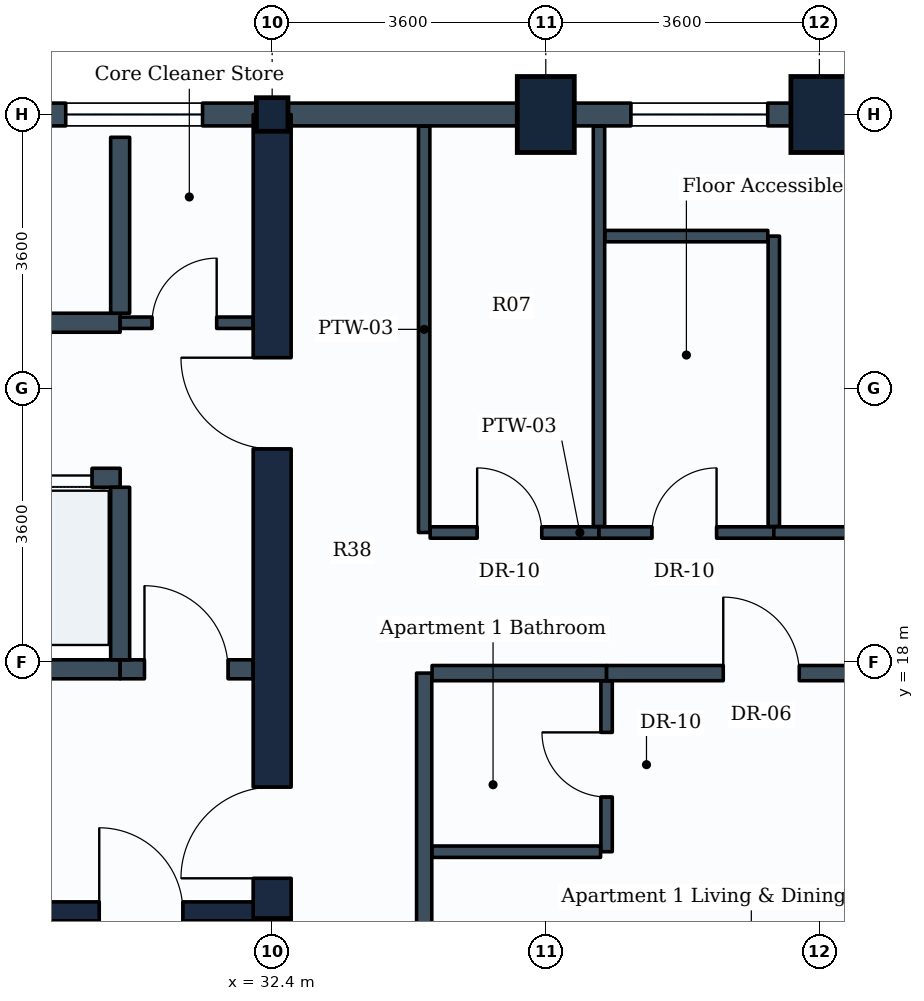
"""IFC4 building model, lengths in metres.
Left out: names, types, materials, properties, quantities, classifications, styles, units other than length and angle.
Written with IfcOpenShell. Run it as: python <this file> out.ifc"""

import sys

from ifc_helpers import new_model, si_unit, direction, frame, frame_2d, origin, origin_2d, place, context, subcontext, project, spatial, rectangle, i_section, extrude, element, fill, save


model = new_model("IFC4")
c1 = context("Model", 3, precision=1e-05, world=origin(), true_north=direction((0.0, 1.0)))
c2 = subcontext(c1, "Body", "Model", "MODEL_VIEW")
j1 = project(units=[si_unit("LENGTHUNIT", "METRE"), si_unit("PLANEANGLEUNIT", "RADIAN")], contexts=[c1])
p1 = place(None, origin())
s1 = spatial("IfcSite", under=j1, at=p1, CompositionType="ELEMENT")
p2 = place(p1, origin())
s2 = spatial("IfcBuilding", under=s1, at=p2, CompositionType="ELEMENT")
p3 = place(p2, frame((0.0, 0.0, 142.8)))
s3 = spatial("IfcBuildingStorey", under=s2, at=p3, CompositionType="ELEMENT", Elevation=142.8)
for number, where, z_axis, x_axis in (
    (1, (32.4, 14.4, 0.0), (0.0, 0.0, 1.0), (1.0, 0.0, 0.0)),
    (2, (32.4, 25.2, 0.0), (0.0, 0.0, 1.0), (1.0, 0.0, 0.0)),
):
    element("IfcColumn", number, at=place(p3, frame(where, z_axis=z_axis, x_axis=x_axis)), inside=s3, PredefinedType="COLUMN", context=c2, shape_type="SweptSolid", body=[
        extrude(i_section(OverallWidth=0.416, OverallDepth=0.442, WebThickness=0.025, FlangeThickness=0.041, FilletRadius=0.015, at=origin_2d()), origin(), (0.0, 0.0, 1.0), 3.8),
    ])
for number, where, z_axis, x_axis in (
    (3, (36.0, 25.2, 0.0), (0.0, 0.0, 1.0), (1.0, 0.0, 0.0)),
    (4, (39.6, 25.2, 0.0), (0.0, 0.0, 1.0), (1.0, 0.0, 0.0)),
):
    element("IfcColumn", number, at=place(p3, frame(where, z_axis=z_axis, x_axis=x_axis)), inside=s3, PredefinedType="COLUMN", context=c2, shape_type="SweptSolid", body=[
        extrude(rectangle(XDim=0.75, YDim=1.0, at=origin_2d()), origin(), (0.0, 0.0, 1.0), 3.8),
    ])
p4 = place(p3, frame((39.6, 25.2, 0.0), z_axis=(0.0, 0.0, 1.0), x_axis=(1.0, 0.0, 0.0)))
e5 = element("IfcWall", 5, at=p4, inside=s3, PredefinedType="STANDARD", context=c2, shape_type="SweptSolid", body=[
    extrude(rectangle(XDim=1.8, YDim=0.3, at=frame_2d((0.9, 0.0))), origin(), (0.0, 0.0, 1.0), 2.93),
])
p5 = place(p3, frame((36.0, 25.2, 0.0), z_axis=(0.0, 0.0, 1.0), x_axis=(1.0, 0.0, 0.0)))
e6 = element("IfcWall", 6, at=p5, inside=s3, PredefinedType="STANDARD", context=c2, shape_type="SweptSolid", body=[
    extrude(rectangle(XDim=3.6, YDim=0.3, at=frame_2d((1.8, 0.0))), origin(), (0.0, 0.0, 1.0), 2.93),
])
p6 = place(p5, frame((1.12, 0.0, 0.85)))
e7 = element("IfcOpeningElement", 7, at=p6, cuts=e6, PredefinedType="OPENING", context=c2, shape_type="SweptSolid", body=[
    extrude(rectangle(XDim=1.8, YDim=1.35, at=frame_2d((0.9, 0.675))), frame((0.0, 0.16, 0.0), z_axis=(0.0, -1.0, 0.0), x_axis=(1.0, 0.0, 0.0)), (0.0, 0.0, 1.0), 0.32),
])
p7 = place(p3, frame((32.4, 25.2, 0.0), z_axis=(0.0, 0.0, 1.0), x_axis=(1.0, 0.0, 0.0)))
e8 = element("IfcWall", 8, at=p7, inside=s3, PredefinedType="STANDARD", context=c2, shape_type="SweptSolid", body=[
    extrude(rectangle(XDim=3.6, YDim=0.3, at=frame_2d((1.8, 0.0))), origin(), (0.0, 0.0, 1.0), 2.93),
])
p8 = place(p3, frame((28.8, 25.2, 0.0), z_axis=(0.0, 0.0, 1.0), x_axis=(1.0, 0.0, 0.0)))
e9 = element("IfcWall", 9, at=p8, inside=s3, PredefinedType="STANDARD", context=c2, shape_type="SweptSolid", body=[
    extrude(rectangle(XDim=3.6, YDim=0.3, at=frame_2d((1.8, 0.0))), origin(), (0.0, 0.0, 1.0), 3.535),
])
p9 = place(p8, frame((0.884, 0.0, 0.85)))
e10 = element("IfcOpeningElement", 10, at=p9, cuts=e9, PredefinedType="OPENING", context=c2, shape_type="SweptSolid", body=[
    extrude(rectangle(XDim=1.8, YDim=1.35, at=frame_2d((0.9, 0.675))), frame((0.0, 0.16, 0.0), z_axis=(0.0, -1.0, 0.0), x_axis=(1.0, 0.0, 0.0)), (0.0, 0.0, 1.0), 0.32),
])
p10 = place(p3, frame((32.4, 10.8, 0.0), z_axis=(0.0, 0.0, 1.0), x_axis=(0.0, 1.0, 0.0)))
e11 = element("IfcWall", 11, at=p10, inside=s3, PredefinedType="SHEAR", context=c2, shape_type="SweptSolid", body=[
    extrude(rectangle(XDim=14.4, YDim=0.5, at=frame_2d((7.2, 0.0))), origin(), (0.0, 0.0, 1.0), 3.55),
])
p11 = place(p10, frame((4.35, 0.0, 0.0)))
e12 = element("IfcOpeningElement", 12, at=p11, cuts=e11, PredefinedType="OPENING", context=c2, shape_type="SweptSolid", body=[
    extrude(rectangle(XDim=1.2, YDim=2.1, at=frame_2d((0.6, 1.05))), frame((0.0, 0.26, 0.0), z_axis=(0.0, -1.0, 0.0), x_axis=(1.0, 0.0, 0.0)), (0.0, 0.0, 1.0), 0.52),
])
p12 = place(p10, frame((10.0, 0.0, 0.0)))
e13 = element("IfcOpeningElement", 13, at=p12, cuts=e11, PredefinedType="OPENING", context=c2, shape_type="SweptSolid", body=[
    extrude(rectangle(XDim=1.2, YDim=2.1, at=frame_2d((0.6, 1.05))), frame((0.0, 0.26, 0.0), z_axis=(0.0, -1.0, 0.0), x_axis=(1.0, 0.0, 0.0)), (0.0, 0.0, 1.0), 0.52),
])
p13 = place(p3, frame((23.35, 14.715, 0.0), z_axis=(0.0, 0.0, 1.0), x_axis=(1.0, 0.0, 0.0)))
e14 = element("IfcWall", 14, at=p13, inside=s3, PredefinedType="SHEAR", context=c2, shape_type="SweptSolid", body=[
    extrude(rectangle(XDim=8.8, YDim=0.25, at=frame_2d((4.4, 0.0))), origin(), (0.0, 0.0, 1.0), 3.55),
])
p14 = place(p13, frame((6.775, 0.0, 0.0)))
e15 = element("IfcOpeningElement", 15, at=p14, cuts=e14, PredefinedType="OPENING", context=c2, shape_type="SweptSolid", body=[
    extrude(rectangle(XDim=1.1, YDim=2.1, at=frame_2d((0.55, 1.05))), frame((0.0, 0.135, 0.0), z_axis=(0.0, -1.0, 0.0), x_axis=(1.0, 0.0, 0.0)), (0.0, 0.0, 1.0), 0.27),
])
p15 = place(p3, frame((21.88, 17.9, 0.0), z_axis=(0.0, 0.0, 1.0), x_axis=(1.0, 0.0, 0.0)))
e16 = element("IfcWall", 16, at=p15, inside=s3, PredefinedType="PARTITIONING", context=c2, shape_type="SweptSolid", body=[
    extrude(rectangle(XDim=8.52, YDim=0.25, at=frame_2d((4.26, 0.0))), origin(), (0.0, 0.0, 1.0), 3.535),
])
p16 = place(p3, frame((30.4, 17.9, 0.0), z_axis=(0.0, 0.0, 1.0), x_axis=(1.0, 0.0, 0.0)))
e17 = element("IfcWall", 17, at=p16, inside=s3, PredefinedType="PARTITIONING", context=c2, shape_type="SweptSolid", body=[
    extrude(rectangle(XDim=1.75, YDim=0.25, at=frame_2d((0.875, 0.0))), origin(), (0.0, 0.0, 1.0), 3.535),
])
p17 = place(p16, frame((0.32, 0.0, 0.0)))
e18 = element("IfcOpeningElement", 18, at=p17, cuts=e17, PredefinedType="OPENING", context=c2, shape_type="SweptSolid", body=[
    extrude(rectangle(XDim=1.1, YDim=2.1, at=frame_2d((0.55, 1.05))), frame((0.0, 0.135, 0.0), z_axis=(0.0, -1.0, 0.0), x_axis=(1.0, 0.0, 0.0)), (0.0, 0.0, 1.0), 0.27),
])
p18 = place(p3, frame((23.18, 20.42, 0.0), z_axis=(0.0, 0.0, 1.0), x_axis=(1.0, 0.0, 0.0)))
e19 = element("IfcWall", 19, at=p18, inside=s3, PredefinedType="PARTITIONING", context=c2, shape_type="SweptSolid", body=[
    extrude(rectangle(XDim=7.22, YDim=0.25, at=frame_2d((3.61, 0.0))), origin(), (0.0, 0.0, 1.0), 3.535),
])
p19 = place(p18, frame((0.41, 0.0, 0.0)))
e20 = element("IfcOpeningElement", 20, at=p19, cuts=e19, PredefinedType="OPENING", context=c2, shape_type="SweptSolid", body=[
    extrude(rectangle(XDim=1.1, YDim=2.1, at=frame_2d((0.55, 1.05))), frame((0.0, 0.135, 0.0), z_axis=(0.0, -1.0, 0.0), x_axis=(1.0, 0.0, 0.0)), (0.0, 0.0, 1.0), 0.27),
])
p20 = place(p18, frame((2.19, 0.0, 0.0)))
e21 = element("IfcOpeningElement", 21, at=p20, cuts=e19, PredefinedType="OPENING", context=c2, shape_type="SweptSolid", body=[
    extrude(rectangle(XDim=1.1, YDim=2.1, at=frame_2d((0.55, 1.05))), frame((0.0, 0.135, 0.0), z_axis=(0.0, -1.0, 0.0), x_axis=(1.0, 0.0, 0.0)), (0.0, 0.0, 1.0), 0.27),
])
p21 = place(p18, frame((3.97, 0.0, 0.0)))
e22 = element("IfcOpeningElement", 22, at=p21, cuts=e19, PredefinedType="OPENING", context=c2, shape_type="SweptSolid", body=[
    extrude(rectangle(XDim=1.1, YDim=2.1, at=frame_2d((0.55, 1.05))), frame((0.0, 0.135, 0.0), z_axis=(0.0, -1.0, 0.0), x_axis=(1.0, 0.0, 0.0)), (0.0, 0.0, 1.0), 0.27),
])
p22 = place(p18, frame((5.75, 0.0, 0.0)))
e23 = element("IfcOpeningElement", 23, at=p22, cuts=e19, PredefinedType="OPENING", context=c2, shape_type="SweptSolid", body=[
    extrude(rectangle(XDim=1.1, YDim=2.1, at=frame_2d((0.55, 1.05))), frame((0.0, 0.135, 0.0), z_axis=(0.0, -1.0, 0.0), x_axis=(1.0, 0.0, 0.0)), (0.0, 0.0, 1.0), 0.27),
])
p23 = place(p3, frame((30.4, 18.025, 0.0), z_axis=(0.0, 0.0, 1.0), x_axis=(0.0, 1.0, 0.0)))
e24 = element("IfcWall", 24, at=p23, inside=s3, PredefinedType="PARTITIONING", context=c2, shape_type="SweptSolid", body=[
    extrude(rectangle(XDim=2.27, YDim=0.25, at=frame_2d((1.135, 0.0))), origin(), (0.0, 0.0, 1.0), 3.535),
])
p24 = place(p3, frame((23.18, 22.46, 0.0), z_axis=(0.0, 0.0, 1.0), x_axis=(1.0, 0.0, 0.0)))
e25 = element("IfcWall", 25, at=p24, inside=s3, PredefinedType="PARTITIONING", context=c2, shape_type="SweptSolid", body=[
    extrude(rectangle(XDim=7.22, YDim=0.25, at=frame_2d((3.61, 0.0))), origin(), (0.0, 0.0, 1.0), 3.535),
])
p25 = place(p3, frame((30.4, 22.585, 0.0), z_axis=(0.0, 0.0, 1.0), x_axis=(0.0, 1.0, 0.0)))
e26 = element("IfcWall", 26, at=p25, inside=s3, PredefinedType="PARTITIONING", context=c2, shape_type="SweptSolid", body=[
    extrude(rectangle(XDim=2.315, YDim=0.25, at=frame_2d((1.157, 0.0))), origin(), (0.0, 0.0, 1.0), 3.535),
])
p26 = place(p3, frame((30.4, 22.46, 0.0), z_axis=(0.0, 0.0, 1.0), x_axis=(1.0, 0.0, 0.0)))
e27 = element("IfcWall", 27, at=p26, inside=s3, PredefinedType="PARTITIONING", context=c2, shape_type="SweptSolid", body=[
    extrude(rectangle(XDim=1.75, YDim=0.15, at=frame_2d((0.875, 0.0))), origin(), (0.0, 0.0, 1.0), 3.535),
])
p27 = place(p26, frame((0.42, 0.0, 0.0)))
e28 = element("IfcOpeningElement", 28, at=p27, cuts=e27, PredefinedType="OPENING", context=c2, shape_type="SweptSolid", body=[
    extrude(rectangle(XDim=0.85, YDim=2.1, at=frame_2d((0.425, 1.05))), frame((0.0, 0.085, 0.0), z_axis=(0.0, -1.0, 0.0), x_axis=(1.0, 0.0, 0.0)), (0.0, 0.0, 1.0), 0.17),
])
p28 = place(p3, frame((34.4, 19.7, 0.0), z_axis=(0.0, 0.0, 1.0), x_axis=(0.0, 1.0, 0.0)))
e29 = element("IfcWall", 29, at=p28, inside=s3, PredefinedType="PARTITIONING", context=c2, shape_type="SweptSolid", body=[
    extrude(rectangle(XDim=5.346, YDim=0.15, at=frame_2d((2.673, 0.0))), origin(), (0.0, 0.0, 1.0), 2.93),
])
p29 = place(p3, frame((34.479, 19.7, 0.0), z_axis=(0.0, 0.0, 1.0), x_axis=(1.0, 0.0, 0.0)))
e30 = element("IfcWall", 30, at=p29, inside=s3, PredefinedType="PARTITIONING", context=c2, shape_type="SweptSolid", body=[
    extrude(rectangle(XDim=2.221, YDim=0.15, at=frame_2d((1.11, 0.0))), origin(), (0.0, 0.0, 1.0), 3.22),
])
p30 = place(p29, frame((0.618, 0.0, 0.0)))
e31 = element("IfcOpeningElement", 31, at=p30, cuts=e30, PredefinedType="OPENING", context=c2, shape_type="SweptSolid", body=[
    extrude(rectangle(XDim=0.85, YDim=2.1, at=frame_2d((0.425, 1.05))), frame((0.0, 0.085, 0.0), z_axis=(0.0, -1.0, 0.0), x_axis=(1.0, 0.0, 0.0)), (0.0, 0.0, 1.0), 0.17),
])
p31 = place(p3, frame((36.7, 19.779, 0.0), z_axis=(0.0, 0.0, 1.0), x_axis=(0.0, 1.0, 0.0)))
e32 = element("IfcWall", 32, at=p31, inside=s3, PredefinedType="PARTITIONING", context=c2, shape_type="SweptSolid", body=[
    extrude(rectangle(XDim=5.267, YDim=0.15, at=frame_2d((2.633, 0.0))), origin(), (0.0, 0.0, 1.0), 2.93),
])
p32 = place(p3, frame((36.7, 19.7, 0.0), z_axis=(0.0, 0.0, 1.0), x_axis=(1.0, 0.0, 0.0)))
e33 = element("IfcWall", 33, at=p32, inside=s3, PredefinedType="PARTITIONING", context=c2, shape_type="SweptSolid", body=[
    extrude(rectangle(XDim=2.3, YDim=0.15, at=frame_2d((1.15, 0.0))), origin(), (0.0, 0.0, 1.0), 3.535),
])
p33 = place(p32, frame((0.697, 0.0, 0.0)))
e34 = element("IfcOpeningElement", 34, at=p33, cuts=e33, PredefinedType="OPENING", context=c2, shape_type="SweptSolid", body=[
    extrude(rectangle(XDim=0.85, YDim=2.1, at=frame_2d((0.425, 1.05))), frame((0.0, 0.085, 0.0), z_axis=(0.0, -1.0, 0.0), x_axis=(1.0, 0.0, 0.0)), (0.0, 0.0, 1.0), 0.17),
])
p34 = place(p3, frame((39.0, 19.779, 0.0), z_axis=(0.0, 0.0, 1.0), x_axis=(0.0, 1.0, 0.0)))
e35 = element("IfcWall", 35, at=p34, inside=s3, PredefinedType="PARTITIONING", context=c2, shape_type="SweptSolid", body=[
    extrude(rectangle(XDim=3.821, YDim=0.15, at=frame_2d((1.911, 0.0))), origin(), (0.0, 0.0, 1.0), 3.08),
])
p35 = place(p3, frame((36.779, 23.6, 0.0), z_axis=(0.0, 0.0, 1.0), x_axis=(1.0, 0.0, 0.0)))
e36 = element("IfcWall", 36, at=p35, inside=s3, PredefinedType="PARTITIONING", context=c2, shape_type="SweptSolid", body=[
    extrude(rectangle(XDim=2.142, YDim=0.15, at=frame_2d((1.071, 0.0))), origin(), (0.0, 0.0, 1.0), 3.535),
])
p36 = place(p3, frame((34.4, 3.754, 0.0), z_axis=(0.0, 0.0, 1.0), x_axis=(0.0, 1.0, 0.0)))
e37 = element("IfcWall", 37, at=p36, inside=s3, PredefinedType="PARTITIONING", context=c2, shape_type="SweptSolid", body=[
    extrude(rectangle(XDim=14.096, YDim=0.2, at=frame_2d((7.048, 0.0))), origin(), (0.0, 0.0, 1.0), 2.93),
])
p37 = place(p3, frame((34.504, 17.85, 0.0), z_axis=(0.0, 0.0, 1.0), x_axis=(1.0, 0.0, 0.0)))
e38 = element("IfcWall", 38, at=p37, inside=s3, PredefinedType="PARTITIONING", context=c2, shape_type="SweptSolid", body=[
    extrude(rectangle(XDim=2.296, YDim=0.2, at=frame_2d((1.148, 0.0))), origin(), (0.0, 0.0, 1.0), 3.08),
])
p38 = place(p3, frame((36.8, 15.5, 0.0), z_axis=(0.0, 0.0, 1.0), x_axis=(0.0, 1.0, 0.0)))
e39 = element("IfcWall", 39, at=p38, inside=s3, PredefinedType="PARTITIONING", context=c2, shape_type="SweptSolid", body=[
    extrude(rectangle(XDim=2.246, YDim=0.15, at=frame_2d((1.123, 0.0))), origin(), (0.0, 0.0, 1.0), 3.535),
])
p39 = place(p38, frame((0.72, 0.0, 0.0)))
e40 = element("IfcOpeningElement", 40, at=p39, cuts=e39, PredefinedType="OPENING", context=c2, shape_type="SweptSolid", body=[
    extrude(rectangle(XDim=0.85, YDim=2.1, at=frame_2d((0.425, 1.05))), frame((0.0, 0.085, 0.0), z_axis=(0.0, -1.0, 0.0), x_axis=(1.0, 0.0, 0.0)), (0.0, 0.0, 1.0), 0.17),
])
p40 = place(p3, frame((34.504, 15.5, 0.0), z_axis=(0.0, 0.0, 1.0), x_axis=(1.0, 0.0, 0.0)))
e41 = element("IfcWall", 41, at=p40, inside=s3, PredefinedType="PARTITIONING", context=c2, shape_type="SweptSolid", body=[
    extrude(rectangle(XDim=2.217, YDim=0.15, at=frame_2d((1.108, 0.0))), origin(), (0.0, 0.0, 1.0), 3.22),
])
p41 = place(p3, frame((36.8, 17.85, 0.0), z_axis=(0.0, 0.0, 1.0), x_axis=(1.0, 0.0, 0.0)))
e42 = element("IfcWall", 42, at=p41, inside=s3, PredefinedType="PARTITIONING", context=c2, shape_type="SweptSolid", body=[
    extrude(rectangle(XDim=3.966, YDim=0.2, at=frame_2d((1.983, 0.0))), origin(), (0.0, 0.0, 1.0), 3.08),
])
p42 = place(p41, frame((1.535, 0.0, 0.0)))
e43 = element("IfcOpeningElement", 43, at=p42, cuts=e42, PredefinedType="OPENING", context=c2, shape_type="SweptSolid", body=[
    extrude(rectangle(XDim=1.0, YDim=2.1, at=frame_2d((0.5, 1.05))), frame((0.0, 0.11, 0.0), z_axis=(0.0, -1.0, 0.0), x_axis=(1.0, 0.0, 0.0)), (0.0, 0.0, 1.0), 0.22),
])
p43 = place(p3, frame((39.0, 19.7, 0.0), z_axis=(0.0, 0.0, 1.0), x_axis=(1.0, 0.0, 0.0)))
e44 = element("IfcWall", 44, at=p43, inside=s3, PredefinedType="PARTITIONING", context=c2, shape_type="SweptSolid", body=[
    extrude(rectangle(XDim=14.846, YDim=0.15, at=frame_2d((7.423, 0.0))), origin(), (0.0, 0.0, 1.0), 2.93),
])
p44 = place(p43, frame((6.96, 0.0, 0.0)))
e45 = element("IfcOpeningElement", 45, at=p44, cuts=e44, PredefinedType="OPENING", context=c2, shape_type="SweptSolid", body=[
    extrude(rectangle(XDim=1.0, YDim=2.1, at=frame_2d((0.5, 1.05))), frame((0.0, 0.085, 0.0), z_axis=(0.0, -1.0, 0.0), x_axis=(1.0, 0.0, 0.0)), (0.0, 0.0, 1.0), 0.17),
])
p45 = place(p6, origin())
e46 = element("IfcWindow", 46, at=p45, inside=s3, PartitioningType="SINGLE_PANEL", PredefinedType="WINDOW", context=c2, shape_type="SweptSolid", body=[
    extrude(rectangle(XDim=1.8, YDim=1.35, at=frame_2d((0.9, 0.675))), frame((0.0, 0.03, 0.0), z_axis=(0.0, -1.0, 0.0), x_axis=(1.0, 0.0, 0.0)), (0.0, 0.0, 1.0), 0.06),
])
fill(e7, e46)
p46 = place(p9, origin())
e47 = element("IfcWindow", 47, at=p46, inside=s3, PartitioningType="SINGLE_PANEL", PredefinedType="WINDOW", context=c2, shape_type="SweptSolid", body=[
    extrude(rectangle(XDim=1.8, YDim=1.35, at=frame_2d((0.9, 0.675))), frame((0.0, 0.03, 0.0), z_axis=(0.0, -1.0, 0.0), x_axis=(1.0, 0.0, 0.0)), (0.0, 0.0, 1.0), 0.06),
])
fill(e10, e47)
p47 = place(p14, origin())
e48 = element("IfcDoor", 48, at=p47, inside=s3, OperationType="SINGLE_SWING_LEFT", PredefinedType="DOOR", context=c2, shape_type="SweptSolid", body=[
    extrude(rectangle(XDim=1.1, YDim=2.1, at=frame_2d((0.55, 1.05))), frame((0.0, 0.025, 0.0), z_axis=(0.0, -1.0, 0.0), x_axis=(1.0, 0.0, 0.0)), (0.0, 0.0, 1.0), 0.05),
])
fill(e15, e48)
p48 = place(p11, origin())
e49 = element("IfcDoor", 49, at=p48, inside=s3, OperationType="SINGLE_SWING_LEFT", PredefinedType="DOOR", context=c2, shape_type="SweptSolid", body=[
    extrude(rectangle(XDim=1.2, YDim=2.1, at=frame_2d((0.6, 1.05))), frame((0.0, 0.025, 0.0), z_axis=(0.0, -1.0, 0.0), x_axis=(1.0, 0.0, 0.0)), (0.0, 0.0, 1.0), 0.05),
])
fill(e12, e49)
p49 = place(p17, origin())
e50 = element("IfcDoor", 50, at=p49, inside=s3, OperationType="SINGLE_SWING_LEFT", PredefinedType="DOOR", context=c2, shape_type="SweptSolid", body=[
    extrude(rectangle(XDim=1.1, YDim=2.1, at=frame_2d((0.55, 1.05))), frame((0.0, 0.025, 0.0), z_axis=(0.0, -1.0, 0.0), x_axis=(1.0, 0.0, 0.0)), (0.0, 0.0, 1.0), 0.05),
])
fill(e18, e50)
p50 = place(p22, origin())
e51 = element("IfcDoor", 51, at=p50, inside=s3, OperationType="SLIDING_TO_LEFT", PredefinedType="DOOR", context=c2, shape_type="SweptSolid", body=[
    extrude(rectangle(XDim=1.1, YDim=2.1, at=frame_2d((0.55, 1.05))), frame((0.0, 0.025, 0.0), z_axis=(0.0, -1.0, 0.0), x_axis=(1.0, 0.0, 0.0)), (0.0, 0.0, 1.0), 0.05),
])
fill(e23, e51)
p51 = place(p12, origin())
e52 = element("IfcDoor", 52, at=p51, inside=s3, OperationType="SINGLE_SWING_RIGHT", PredefinedType="DOOR", context=c2, shape_type="SweptSolid", body=[
    extrude(rectangle(XDim=1.2, YDim=2.1, at=frame_2d((0.6, 1.05))), frame((0.0, 0.025, 0.0), z_axis=(0.0, -1.0, 0.0), x_axis=(1.0, 0.0, 0.0)), (0.0, 0.0, 1.0), 0.05),
])
fill(e13, e52)
p52 = place(p27, origin())
e53 = element("IfcDoor", 53, at=p52, inside=s3, OperationType="SINGLE_SWING_RIGHT", PredefinedType="DOOR", context=c2, shape_type="SweptSolid", body=[
    extrude(rectangle(XDim=0.85, YDim=2.1, at=frame_2d((0.425, 1.05))), frame((0.0, 0.025, 0.0), z_axis=(0.0, -1.0, 0.0), x_axis=(1.0, 0.0, 0.0)), (0.0, 0.0, 1.0), 0.05),
])
fill(e28, e53)
p53 = place(p30, origin())
e54 = element("IfcDoor", 54, at=p53, inside=s3, OperationType="SINGLE_SWING_LEFT", PredefinedType="DOOR", context=c2, shape_type="SweptSolid", body=[
    extrude(rectangle(XDim=0.85, YDim=2.1, at=frame_2d((0.425, 1.05))), frame((0.0, 0.025, 0.0), z_axis=(0.0, -1.0, 0.0), x_axis=(1.0, 0.0, 0.0)), (0.0, 0.0, 1.0), 0.05),
])
fill(e31, e54)
p54 = place(p33, origin())
e55 = element("IfcDoor", 55, at=p54, inside=s3, OperationType="SINGLE_SWING_RIGHT", PredefinedType="DOOR", context=c2, shape_type="SweptSolid", body=[
    extrude(rectangle(XDim=0.85, YDim=2.1, at=frame_2d((0.425, 1.05))), frame((0.0, 0.025, 0.0), z_axis=(0.0, -1.0, 0.0), x_axis=(1.0, 0.0, 0.0)), (0.0, 0.0, 1.0), 0.05),
])
fill(e34, e55)
p55 = place(p39, origin())
e56 = element("IfcDoor", 56, at=p55, inside=s3, OperationType="SINGLE_SWING_RIGHT", PredefinedType="DOOR", context=c2, shape_type="SweptSolid", body=[
    extrude(rectangle(XDim=0.85, YDim=2.1, at=frame_2d((0.425, 1.05))), frame((0.0, 0.025, 0.0), z_axis=(0.0, -1.0, 0.0), x_axis=(1.0, 0.0, 0.0)), (0.0, 0.0, 1.0), 0.05),
])
fill(e40, e56)
p56 = place(p42, origin())
e57 = element("IfcDoor", 57, at=p56, inside=s3, OperationType="SINGLE_SWING_LEFT", PredefinedType="DOOR", context=c2, shape_type="SweptSolid", body=[
    extrude(rectangle(XDim=1.0, YDim=2.1, at=frame_2d((0.5, 1.05))), frame((0.0, 0.025, 0.0), z_axis=(0.0, -1.0, 0.0), x_axis=(1.0, 0.0, 0.0)), (0.0, 0.0, 1.0), 0.05),
])
fill(e43, e57)
save(model, sys.argv[1])
